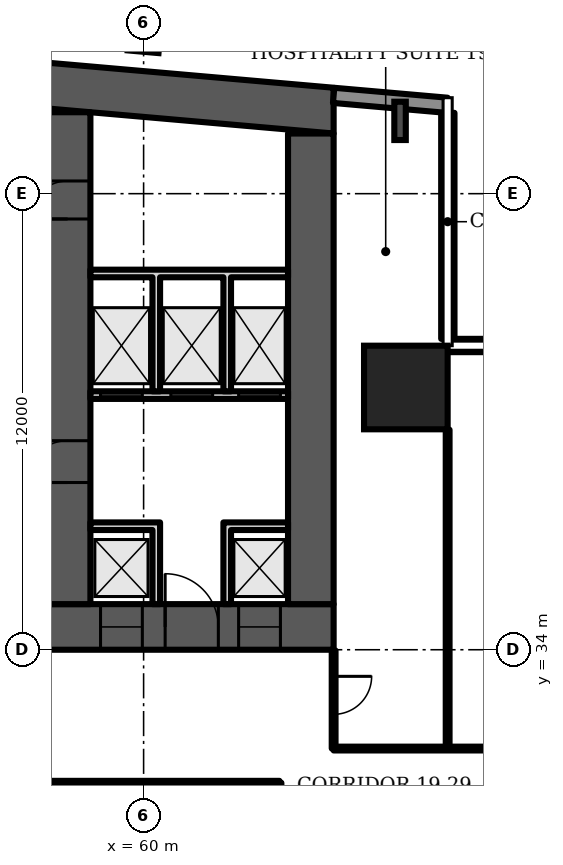
"""IFC4 building model, lengths in metres.
Left out: names, types, materials, properties, quantities, classifications, styles, units other than length and angle.
Written with IfcOpenShell. Run it as: python <this file> out.ifc"""

import sys

from ifc_helpers import new_model, si_unit, direction, frame, frame_2d, origin, origin_2d, place, context, subcontext, project, spatial, polyline, rectangle, i_section, outline, extrude, element, fill, save


model = new_model("IFC4")
c1 = context("Model", 3, precision=1e-05, world=origin(), true_north=direction((0.0, 1.0)))
c2 = subcontext(c1, "Body", "Model", "MODEL_VIEW")
j1 = project(units=[si_unit("LENGTHUNIT", "METRE"), si_unit("PLANEANGLEUNIT", "RADIAN")], contexts=[c1])
p1 = place(None, origin())
s1 = spatial("IfcSite", under=j1, at=p1, CompositionType="ELEMENT")
p2 = place(p1, origin())
s2 = spatial("IfcBuilding", under=s1, at=p2, CompositionType="ELEMENT")
p3 = place(p2, frame((0.0, 0.0, 88.3)))
s3 = spatial("IfcBuildingStorey", under=s2, at=p3, CompositionType="ELEMENT", Elevation=88.3)
p4 = place(p3, frame((0.0, 0.0, -0.0)))
e1 = element("IfcWall", 1, at=p4, inside=s3, PredefinedType="SHEAR", context=c2, shape_type="SweptSolid", body=[
    extrude(outline(polyline([(9.0, 47.583), (37.0, 50.032), (65.0, 47.583), (65.0, 48.787), (37.0, 51.237), (9.0, 48.787), (9.0, 47.583)])), origin(), (0.0, 0.0, 1.0), 3.6),
])
p5 = place(p3, frame((9.0, 34.6, 0.0), z_axis=(0.0, 0.0, 1.0), x_axis=(1.0, 0.0, 0.0)))
e2 = element("IfcWall", 2, at=p5, inside=s3, PredefinedType="SHEAR", context=c2, shape_type="SweptSolid", body=[
    extrude(rectangle(XDim=56.0, YDim=1.2, at=frame_2d((28.0, 0.0))), origin(), (0.0, 0.0, 1.0), 3.6),
])
p6 = place(p5, frame((2.0, 0.0, 0.0)))
e3 = element("IfcOpeningElement", 3, at=p6, cuts=e2, PredefinedType="OPENING", context=c2, shape_type="SweptSolid", body=[
    extrude(rectangle(XDim=1.0, YDim=2.1, at=frame_2d((0.5, 1.05))), frame((0.0, 0.61, 0.0), z_axis=(0.0, -1.0, 0.0), x_axis=(1.0, 0.0, 0.0)), (0.0, 0.0, 1.0), 1.22),
])
p7 = place(p5, frame((4.6, 0.0, 0.0)))
e4 = element("IfcOpeningElement", 4, at=p7, cuts=e2, PredefinedType="OPENING", context=c2, shape_type="SweptSolid", body=[
    extrude(rectangle(XDim=1.0, YDim=2.1, at=frame_2d((0.5, 1.05))), frame((0.0, 0.61, 0.0), z_axis=(0.0, -1.0, 0.0), x_axis=(1.0, 0.0, 0.0)), (0.0, 0.0, 1.0), 1.22),
])
p8 = place(p5, frame((7.867, 0.0, 0.0)))
e5 = element("IfcOpeningElement", 5, at=p8, cuts=e2, PredefinedType="OPENING", context=c2, shape_type="SweptSolid", body=[
    extrude(rectangle(XDim=1.1, YDim=2.1, at=frame_2d((0.55, 1.05))), frame((0.0, 0.61, 0.0), z_axis=(0.0, -1.0, 0.0), x_axis=(1.0, 0.0, 0.0)), (0.0, 0.0, 1.0), 1.22),
])
p9 = place(p5, frame((12.033, 0.0, 0.0)))
e6 = element("IfcOpeningElement", 6, at=p9, cuts=e2, PredefinedType="OPENING", context=c2, shape_type="SweptSolid", body=[
    extrude(rectangle(XDim=1.1, YDim=2.1, at=frame_2d((0.55, 1.05))), frame((0.0, 0.61, 0.0), z_axis=(0.0, -1.0, 0.0), x_axis=(1.0, 0.0, 0.0)), (0.0, 0.0, 1.0), 1.22),
])
p10 = place(p5, frame((9.8, 0.0, 0.0)))
e7 = element("IfcOpeningElement", 7, at=p10, cuts=e2, PredefinedType="OPENING", context=c2, shape_type="SweptSolid", body=[
    extrude(rectangle(XDim=1.4, YDim=2.1, at=frame_2d((0.7, 1.05))), frame((0.0, 0.61, 0.0), z_axis=(0.0, -1.0, 0.0), x_axis=(1.0, 0.0, 0.0)), (0.0, 0.0, 1.0), 1.22),
])
p11 = place(p5, frame((14.65, 0.0, 0.0)))
e8 = element("IfcOpeningElement", 8, at=p11, cuts=e2, PredefinedType="OPENING", context=c2, shape_type="SweptSolid", body=[
    extrude(rectangle(XDim=1.2, YDim=2.1, at=frame_2d((0.6, 1.05))), frame((0.0, 0.61, 0.0), z_axis=(0.0, -1.0, 0.0), x_axis=(1.0, 0.0, 0.0)), (0.0, 0.0, 1.0), 1.22),
])
p12 = place(p5, frame((21.867, 0.0, 0.0)))
e9 = element("IfcOpeningElement", 9, at=p12, cuts=e2, PredefinedType="OPENING", context=c2, shape_type="SweptSolid", body=[
    extrude(rectangle(XDim=1.1, YDim=2.1, at=frame_2d((0.55, 1.05))), frame((0.0, 0.61, 0.0), z_axis=(0.0, -1.0, 0.0), x_axis=(1.0, 0.0, 0.0)), (0.0, 0.0, 1.0), 1.22),
])
p13 = place(p5, frame((26.033, 0.0, 0.0)))
e10 = element("IfcOpeningElement", 10, at=p13, cuts=e2, PredefinedType="OPENING", context=c2, shape_type="SweptSolid", body=[
    extrude(rectangle(XDim=1.1, YDim=2.1, at=frame_2d((0.55, 1.05))), frame((0.0, 0.61, 0.0), z_axis=(0.0, -1.0, 0.0), x_axis=(1.0, 0.0, 0.0)), (0.0, 0.0, 1.0), 1.22),
])
p14 = place(p5, frame((23.8, 0.0, 0.0)))
e11 = element("IfcOpeningElement", 11, at=p14, cuts=e2, PredefinedType="OPENING", context=c2, shape_type="SweptSolid", body=[
    extrude(rectangle(XDim=1.4, YDim=2.1, at=frame_2d((0.7, 1.05))), frame((0.0, 0.61, 0.0), z_axis=(0.0, -1.0, 0.0), x_axis=(1.0, 0.0, 0.0)), (0.0, 0.0, 1.0), 1.22),
])
p15 = place(p5, frame((28.867, 0.0, 0.0)))
e12 = element("IfcOpeningElement", 12, at=p15, cuts=e2, PredefinedType="OPENING", context=c2, shape_type="SweptSolid", body=[
    extrude(rectangle(XDim=1.1, YDim=2.1, at=frame_2d((0.55, 1.05))), frame((0.0, 0.61, 0.0), z_axis=(0.0, -1.0, 0.0), x_axis=(1.0, 0.0, 0.0)), (0.0, 0.0, 1.0), 1.22),
])
p16 = place(p5, frame((33.033, 0.0, 0.0)))
e13 = element("IfcOpeningElement", 13, at=p16, cuts=e2, PredefinedType="OPENING", context=c2, shape_type="SweptSolid", body=[
    extrude(rectangle(XDim=1.1, YDim=2.1, at=frame_2d((0.55, 1.05))), frame((0.0, 0.61, 0.0), z_axis=(0.0, -1.0, 0.0), x_axis=(1.0, 0.0, 0.0)), (0.0, 0.0, 1.0), 1.22),
])
p17 = place(p5, frame((40.15, 0.0, 0.0)))
e14 = element("IfcOpeningElement", 14, at=p17, cuts=e2, PredefinedType="OPENING", context=c2, shape_type="SweptSolid", body=[
    extrude(rectangle(XDim=1.2, YDim=2.1, at=frame_2d((0.6, 1.05))), frame((0.0, 0.61, 0.0), z_axis=(0.0, -1.0, 0.0), x_axis=(1.0, 0.0, 0.0)), (0.0, 0.0, 1.0), 1.22),
])
p18 = place(p5, frame((44.8, 0.0, 0.0)))
e15 = element("IfcOpeningElement", 15, at=p18, cuts=e2, PredefinedType="OPENING", context=c2, shape_type="SweptSolid", body=[
    extrude(rectangle(XDim=1.4, YDim=2.1, at=frame_2d((0.7, 1.05))), frame((0.0, 0.61, 0.0), z_axis=(0.0, -1.0, 0.0), x_axis=(1.0, 0.0, 0.0)), (0.0, 0.0, 1.0), 1.22),
])
p19 = place(p5, frame((49.867, 0.0, 0.0)))
e16 = element("IfcOpeningElement", 16, at=p19, cuts=e2, PredefinedType="OPENING", context=c2, shape_type="SweptSolid", body=[
    extrude(rectangle(XDim=1.1, YDim=2.1, at=frame_2d((0.55, 1.05))), frame((0.0, 0.61, 0.0), z_axis=(0.0, -1.0, 0.0), x_axis=(1.0, 0.0, 0.0)), (0.0, 0.0, 1.0), 1.22),
])
p20 = place(p5, frame((53.5, 0.0, 0.0)))
e17 = element("IfcOpeningElement", 17, at=p20, cuts=e2, PredefinedType="OPENING", context=c2, shape_type="SweptSolid", body=[
    extrude(rectangle(XDim=1.1, YDim=2.1, at=frame_2d((0.55, 1.05))), frame((0.0, 0.61, 0.0), z_axis=(0.0, -1.0, 0.0), x_axis=(1.0, 0.0, 0.0)), (0.0, 0.0, 1.0), 1.22),
])
p21 = place(p5, frame((51.567, 0.0, 0.0)))
e18 = element("IfcOpeningElement", 18, at=p21, cuts=e2, PredefinedType="OPENING", context=c2, shape_type="SweptSolid", body=[
    extrude(rectangle(XDim=1.4, YDim=2.1, at=frame_2d((0.7, 1.05))), frame((0.0, 0.61, 0.0), z_axis=(0.0, -1.0, 0.0), x_axis=(1.0, 0.0, 0.0)), (0.0, 0.0, 1.0), 1.22),
])
p22 = place(p3, frame((58.0, 35.2, 0.0), z_axis=(0.0, 0.0, 1.0), x_axis=(0.0, 1.0, 0.0)))
e19 = element("IfcWall", 19, at=p22, inside=s3, PredefinedType="SHEAR", context=c2, shape_type="SweptSolid", body=[
    extrude(rectangle(XDim=12.943, YDim=1.2, at=frame_2d((6.471, 0.0))), origin(), (0.0, 0.0, 1.0), 3.6),
])
p23 = place(p22, frame((10.134, 0.0, 0.0)))
e20 = element("IfcOpeningElement", 20, at=p23, cuts=e19, PredefinedType="OPENING", context=c2, shape_type="SweptSolid", body=[
    extrude(rectangle(XDim=1.0, YDim=2.1, at=frame_2d((0.5, 1.05))), frame((0.0, 0.61, 0.0), z_axis=(0.0, -1.0, 0.0), x_axis=(1.0, 0.0, 0.0)), (0.0, 0.0, 1.0), 1.22),
])
p24 = place(p22, frame((3.2, 0.0, 0.0)))
e21 = element("IfcOpeningElement", 21, at=p24, cuts=e19, PredefinedType="OPENING", context=c2, shape_type="SweptSolid", body=[
    extrude(rectangle(XDim=1.1, YDim=2.1, at=frame_2d((0.55, 1.05))), frame((0.0, 0.61, 0.0), z_axis=(0.0, -1.0, 0.0), x_axis=(1.0, 0.0, 0.0)), (0.0, 0.0, 1.0), 1.22),
])
p25 = place(p3, frame((64.4, 35.2, 0.0), z_axis=(0.0, 0.0, 1.0), x_axis=(0.0, 1.0, 0.0)))
e22 = element("IfcWall", 22, at=p25, inside=s3, PredefinedType="SHEAR", context=c2, shape_type="SweptSolid", body=[
    extrude(rectangle(XDim=12.383, YDim=1.2, at=frame_2d((6.191, 0.0))), origin(), (0.0, 0.0, 1.0), 3.6),
])
p26 = place(p3, frame((66.9, 40.9, 0.0), z_axis=(0.0, 0.0, 1.0), x_axis=(1.0, 0.0, 0.0)))
e23 = element("IfcColumn", 23, at=p26, inside=s3, PredefinedType="COLUMN", context=c2, shape_type="SweptSolid", body=[
    extrude(rectangle(XDim=2.2, YDim=2.2, at=origin_2d()), origin(), (0.0, 0.0, 1.0), 3.6),
])
p27 = place(p3, frame((66.748, 47.915, 0.0), z_axis=(0.0, 0.0, 1.0), x_axis=(1.0, 0.0, 0.0)))
e24 = element("IfcColumn", 24, at=p27, inside=s3, PredefinedType="COLUMN", context=c2, shape_type="SweptSolid", body=[
    extrude(i_section(OverallWidth=0.302, OverallDepth=1.008, WebThickness=0.021, FlangeThickness=0.04, FilletRadius=0.03, at=origin_2d()), origin(), (0.0, 0.0, 1.0), 3.6),
])
p28 = place(p3, frame((60.0, 49.885, 0.0), z_axis=(0.0, 0.0, 1.0), x_axis=(0.087156, 0.996197, 0.0)))
e25 = element("IfcColumn", 25, at=p28, inside=s3, PredefinedType="COLUMN", context=c2, shape_type="SweptSolid", body=[
    extrude(i_section(OverallWidth=0.303, OverallDepth=0.814, WebThickness=0.021, FlangeThickness=0.04, FilletRadius=0.03, at=origin_2d()), origin(), (0.0, 0.0, 1.0), 3.6),
])
p29 = place(p3, frame((67.983, 48.326, 0.0), z_axis=(0.0, 0.0, 1.0), x_axis=(-0.996194, 0.087168, 0.0)))
e26 = element("IfcWall", 26, at=p29, inside=s3, PredefinedType="SOLIDWALL", context=c2, shape_type="SweptSolid", body=[
    extrude(rectangle(XDim=2.994, YDim=0.4, at=frame_2d((1.497, 0.0))), origin(), (0.0, 0.0, 1.0), 3.15),
])
p30 = place(p3, frame((76.047, 42.005, 0.0), z_axis=(0.0, 0.0, 1.0), x_axis=(-1.0, 0.0, 0.0)))
e27 = element("IfcWall", 27, at=p30, inside=s3, PredefinedType="SOLIDWALL", context=c2, shape_type="SweptSolid", body=[
    extrude(rectangle(XDim=8.047, YDim=0.35, at=frame_2d((4.023, 0.0))), origin(), (0.0, 0.0, 1.0), 1.0),
])
p31 = place(p3, frame((68.005, 42.18, 0.0), z_axis=(0.0, 0.0, 1.0), x_axis=(0.0, 1.0, 0.0)))
e28 = element("IfcWall", 28, at=p31, inside=s3, PredefinedType="SOLIDWALL", context=c2, shape_type="SweptSolid", body=[
    extrude(rectangle(XDim=5.947, YDim=0.35, at=frame_2d((2.973, 0.0))), origin(), (0.0, 0.0, 1.0), 1.0),
])
p32 = place(p3, frame((58.6, 40.7, 0.0), z_axis=(0.0, 0.0, 1.0), x_axis=(1.0, 0.0, 0.0)))
e29 = element("IfcWall", 29, at=p32, inside=s3, PredefinedType="PARTITIONING", context=c2, shape_type="SweptSolid", body=[
    extrude(rectangle(XDim=5.2, YDim=0.2, at=frame_2d((2.6, 0.0))), origin(), (0.0, 0.0, 1.0), 3.15),
])
p33 = place(p32, frame((0.267, 0.0, 0.0)))
e30 = element("IfcOpeningElement", 30, at=p33, cuts=e29, PredefinedType="OPENING", context=c2, shape_type="SweptSolid", body=[
    extrude(rectangle(XDim=1.1, YDim=2.1, at=frame_2d((0.55, 1.05))), frame((0.0, 0.11, 0.0), z_axis=(0.0, -1.0, 0.0), x_axis=(1.0, 0.0, 0.0)), (0.0, 0.0, 1.0), 0.22),
])
p34 = place(p32, frame((2.117, 0.0, 0.0)))
e31 = element("IfcOpeningElement", 31, at=p34, cuts=e29, PredefinedType="OPENING", context=c2, shape_type="SweptSolid", body=[
    extrude(rectangle(XDim=1.1, YDim=2.1, at=frame_2d((0.55, 1.05))), frame((0.0, 0.11, 0.0), z_axis=(0.0, -1.0, 0.0), x_axis=(1.0, 0.0, 0.0)), (0.0, 0.0, 1.0), 0.22),
])
p35 = place(p32, frame((3.9, 0.0, 0.0)))
e32 = element("IfcOpeningElement", 32, at=p35, cuts=e29, PredefinedType="OPENING", context=c2, shape_type="SweptSolid", body=[
    extrude(rectangle(XDim=1.1, YDim=2.1, at=frame_2d((0.55, 1.05))), frame((0.0, 0.11, 0.0), z_axis=(0.0, -1.0, 0.0), x_axis=(1.0, 0.0, 0.0)), (0.0, 0.0, 1.0), 0.22),
])
p36 = place(p3, frame((0.0, 0.0, -0.0)))
e33 = element("IfcWall", 33, at=p36, inside=s3, PredefinedType="PARTITIONING", context=c2, shape_type="SweptSolid", body=[
    extrude(outline(polyline([(60.233, 37.15), (58.6, 37.15), (58.6, 37.35), (60.233, 37.35), (60.433, 37.35), (60.433, 35.2), (60.233, 35.2), (60.233, 37.15)])), origin(), (0.0, 0.0, 1.0), 3.15),
])
p37 = place(p3, frame((0.0, 0.0, -0.0)))
e34 = element("IfcWall", 34, at=p37, inside=s3, PredefinedType="PARTITIONING", context=c2, shape_type="SweptSolid", body=[
    extrude(outline(polyline([(62.1, 37.35), (62.3, 37.35), (63.8, 37.35), (63.8, 37.15), (62.3, 37.15), (62.3, 35.2), (62.1, 35.2), (62.1, 37.35)])), origin(), (0.0, 0.0, 1.0), 3.15),
])
p38 = place(p3, frame((0.0, 0.0, -0.0)))
e35 = element("IfcWall", 35, at=p38, inside=s3, PredefinedType="PARTITIONING", context=c2, shape_type="SweptSolid", body=[
    extrude(outline(polyline([(60.433, 40.8), (60.233, 40.8), (60.233, 43.8), (58.6, 43.8), (58.6, 44.0), (63.8, 44.0), (63.8, 43.8), (62.3, 43.8), (62.3, 40.8), (62.1, 40.8), (62.1, 43.8), (60.433, 43.8), (60.433, 40.8)])), origin(), (0.0, 0.0, 1.0), 3.15),
])
p39 = place(p3, frame((45.3, 30.5, 0.0), z_axis=(0.0, 0.0, 1.0), x_axis=(1.0, 0.0, 0.0)))
e36 = element("IfcWall", 36, at=p39, inside=s3, PredefinedType="PARTITIONING", context=c2, shape_type="SweptSolid", body=[
    extrude(rectangle(XDim=18.275, YDim=0.1, at=frame_2d((9.137, 0.0))), origin(), (0.0, 0.0, 1.0), 3.15),
])
p40 = place(p3, frame((61.67, 14.93, 0.0), z_axis=(0.0, 0.0, 1.0), x_axis=(0.0, 1.0, 0.0)))
e37 = element("IfcWall", 37, at=p40, inside=s3, PredefinedType="PARTITIONING", context=c2, shape_type="SweptSolid", body=[
    extrude(rectangle(XDim=15.57, YDim=0.1, at=frame_2d((7.785, 0.0))), origin(), (0.0, 0.0, 1.0), 3.15),
])
p41 = place(p3, frame((63.575, 29.075, 0.0), z_axis=(0.0, 0.0, 1.0), x_axis=(0.0, 1.0, 0.0)))
e38 = element("IfcWall", 38, at=p41, inside=s3, PredefinedType="PARTITIONING", context=c2, shape_type="SweptSolid", body=[
    extrude(rectangle(XDim=1.425, YDim=0.1, at=frame_2d((0.712, 0.0))), origin(), (0.0, 0.0, 1.0), 3.15),
])
p42 = place(p3, frame((65.0, 31.4, 0.0), z_axis=(0.0, 0.0, 1.0), x_axis=(0.0, 1.0, 0.0)))
e39 = element("IfcWall", 39, at=p42, inside=s3, PredefinedType="PARTITIONING", context=c2, shape_type="SweptSolid", body=[
    extrude(rectangle(XDim=2.58, YDim=0.1, at=frame_2d((1.29, 0.0))), origin(), (0.0, 0.0, 1.0), 3.15),
])
p43 = place(p42, frame((0.9, 0.0, 0.0)))
e40 = element("IfcOpeningElement", 40, at=p43, cuts=e39, PredefinedType="OPENING", context=c2, shape_type="SweptSolid", body=[
    extrude(rectangle(XDim=1.0, YDim=2.1, at=frame_2d((0.5, 1.05))), frame((0.0, 0.06, 0.0), z_axis=(0.0, -1.0, 0.0), x_axis=(1.0, 0.0, 0.0)), (0.0, 0.0, 1.0), 0.12),
])
p44 = place(p3, frame((65.0, 31.4, 0.0), z_axis=(0.0, 0.0, 1.0), x_axis=(1.0, 0.0, 0.0)))
e41 = element("IfcWall", 41, at=p44, inside=s3, PredefinedType="PARTITIONING", context=c2, shape_type="SweptSolid", body=[
    extrude(rectangle(XDim=7.125, YDim=0.1, at=frame_2d((3.562, 0.0))), origin(), (0.0, 0.0, 1.0), 3.15),
])
p45 = place(p44, frame((5.705, 0.0, 0.0)))
e42 = element("IfcOpeningElement", 42, at=p45, cuts=e41, PredefinedType="OPENING", context=c2, shape_type="SweptSolid", body=[
    extrude(rectangle(XDim=1.0, YDim=2.1, at=frame_2d((0.5, 1.05))), frame((0.0, 0.06, 0.0), z_axis=(0.0, -1.0, 0.0), x_axis=(1.0, 0.0, 0.0)), (0.0, 0.0, 1.0), 0.12),
])
p46 = place(p3, frame((68.0, 31.4, 0.0), z_axis=(0.0, 0.0, 1.0), x_axis=(0.0, 1.0, 0.0)))
e43 = element("IfcWall", 43, at=p46, inside=s3, PredefinedType="PARTITIONING", context=c2, shape_type="SweptSolid", body=[
    extrude(rectangle(XDim=8.39, YDim=0.1, at=frame_2d((4.195, 0.0))), origin(), (0.0, 0.0, 1.0), 3.15),
])
p47 = place(p19, origin())
e44 = element("IfcDoor", 44, at=p47, inside=s3, OperationType="DOUBLE_DOOR_SLIDING", PredefinedType="DOOR", context=c2, shape_type="SweptSolid", body=[
    extrude(rectangle(XDim=1.1, YDim=2.1, at=frame_2d((0.55, 1.05))), frame((0.0, 0.025, 0.0), z_axis=(0.0, -1.0, 0.0), x_axis=(1.0, 0.0, 0.0)), (0.0, 0.0, 1.0), 0.05),
])
fill(e16, e44)
p48 = place(p20, origin())
e45 = element("IfcDoor", 45, at=p48, inside=s3, OperationType="DOUBLE_DOOR_SLIDING", PredefinedType="DOOR", context=c2, shape_type="SweptSolid", body=[
    extrude(rectangle(XDim=1.1, YDim=2.1, at=frame_2d((0.55, 1.05))), frame((0.0, 0.025, 0.0), z_axis=(0.0, -1.0, 0.0), x_axis=(1.0, 0.0, 0.0)), (0.0, 0.0, 1.0), 0.05),
])
fill(e17, e45)
p49 = place(p21, origin())
e46 = element("IfcDoor", 46, at=p49, inside=s3, OperationType="DOUBLE_DOOR_SINGLE_SWING", PredefinedType="DOOR", context=c2, shape_type="SweptSolid", body=[
    extrude(rectangle(XDim=1.4, YDim=2.1, at=frame_2d((0.7, 1.05))), frame((0.0, 0.025, 0.0), z_axis=(0.0, -1.0, 0.0), x_axis=(1.0, 0.0, 0.0)), (0.0, 0.0, 1.0), 0.05),
])
fill(e18, e46)
p50 = place(p33, origin())
e47 = element("IfcDoor", 47, at=p50, inside=s3, OperationType="DOUBLE_DOOR_SLIDING", PredefinedType="DOOR", context=c2, shape_type="SweptSolid", body=[
    extrude(rectangle(XDim=1.1, YDim=2.1, at=frame_2d((0.55, 1.05))), frame((0.0, 0.025, 0.0), z_axis=(0.0, -1.0, 0.0), x_axis=(1.0, 0.0, 0.0)), (0.0, 0.0, 1.0), 0.05),
])
fill(e30, e47)
p51 = place(p34, origin())
e48 = element("IfcDoor", 48, at=p51, inside=s3, OperationType="DOUBLE_DOOR_SLIDING", PredefinedType="DOOR", context=c2, shape_type="SweptSolid", body=[
    extrude(rectangle(XDim=1.1, YDim=2.1, at=frame_2d((0.55, 1.05))), frame((0.0, 0.025, 0.0), z_axis=(0.0, -1.0, 0.0), x_axis=(1.0, 0.0, 0.0)), (0.0, 0.0, 1.0), 0.05),
])
fill(e31, e48)
p52 = place(p35, origin())
e49 = element("IfcDoor", 49, at=p52, inside=s3, OperationType="DOUBLE_DOOR_SLIDING", PredefinedType="DOOR", context=c2, shape_type="SweptSolid", body=[
    extrude(rectangle(XDim=1.1, YDim=2.1, at=frame_2d((0.55, 1.05))), frame((0.0, 0.025, 0.0), z_axis=(0.0, -1.0, 0.0), x_axis=(1.0, 0.0, 0.0)), (0.0, 0.0, 1.0), 0.05),
])
fill(e32, e49)
p53 = place(p23, origin())
e50 = element("IfcDoor", 50, at=p53, inside=s3, OperationType="SINGLE_SWING_LEFT", PredefinedType="DOOR", context=c2, shape_type="SweptSolid", body=[
    extrude(rectangle(XDim=1.0, YDim=2.1, at=frame_2d((0.5, 1.05))), frame((0.0, 0.6, 0.0), z_axis=(0.0, -1.0, 0.0), x_axis=(1.0, 0.0, 0.0)), (0.0, 0.0, 1.0), 1.199),
])
fill(e20, e50)
p54 = place(p24, origin())
e51 = element("IfcDoor", 51, at=p54, inside=s3, OperationType="SINGLE_SWING_LEFT", PredefinedType="DOOR", context=c2, shape_type="SweptSolid", body=[
    extrude(rectangle(XDim=1.1, YDim=2.1, at=frame_2d((0.55, 1.05))), frame((0.0, 0.025, 0.0), z_axis=(0.0, -1.0, 0.0), x_axis=(1.0, 0.0, 0.0)), (0.0, 0.0, 1.0), 0.05),
])
fill(e21, e51)
p55 = place(p43, origin())
e52 = element("IfcDoor", 52, at=p55, inside=s3, OperationType="SINGLE_SWING_RIGHT", PredefinedType="DOOR", context=c2, shape_type="SweptSolid", body=[
    extrude(rectangle(XDim=1.0, YDim=2.1, at=frame_2d((0.5, 1.05))), frame((0.0, 0.025, 0.0), z_axis=(0.0, -1.0, 0.0), x_axis=(1.0, 0.0, 0.0)), (0.0, 0.0, 1.0), 0.05),
])
fill(e40, e52)
save(model, sys.argv[1])
